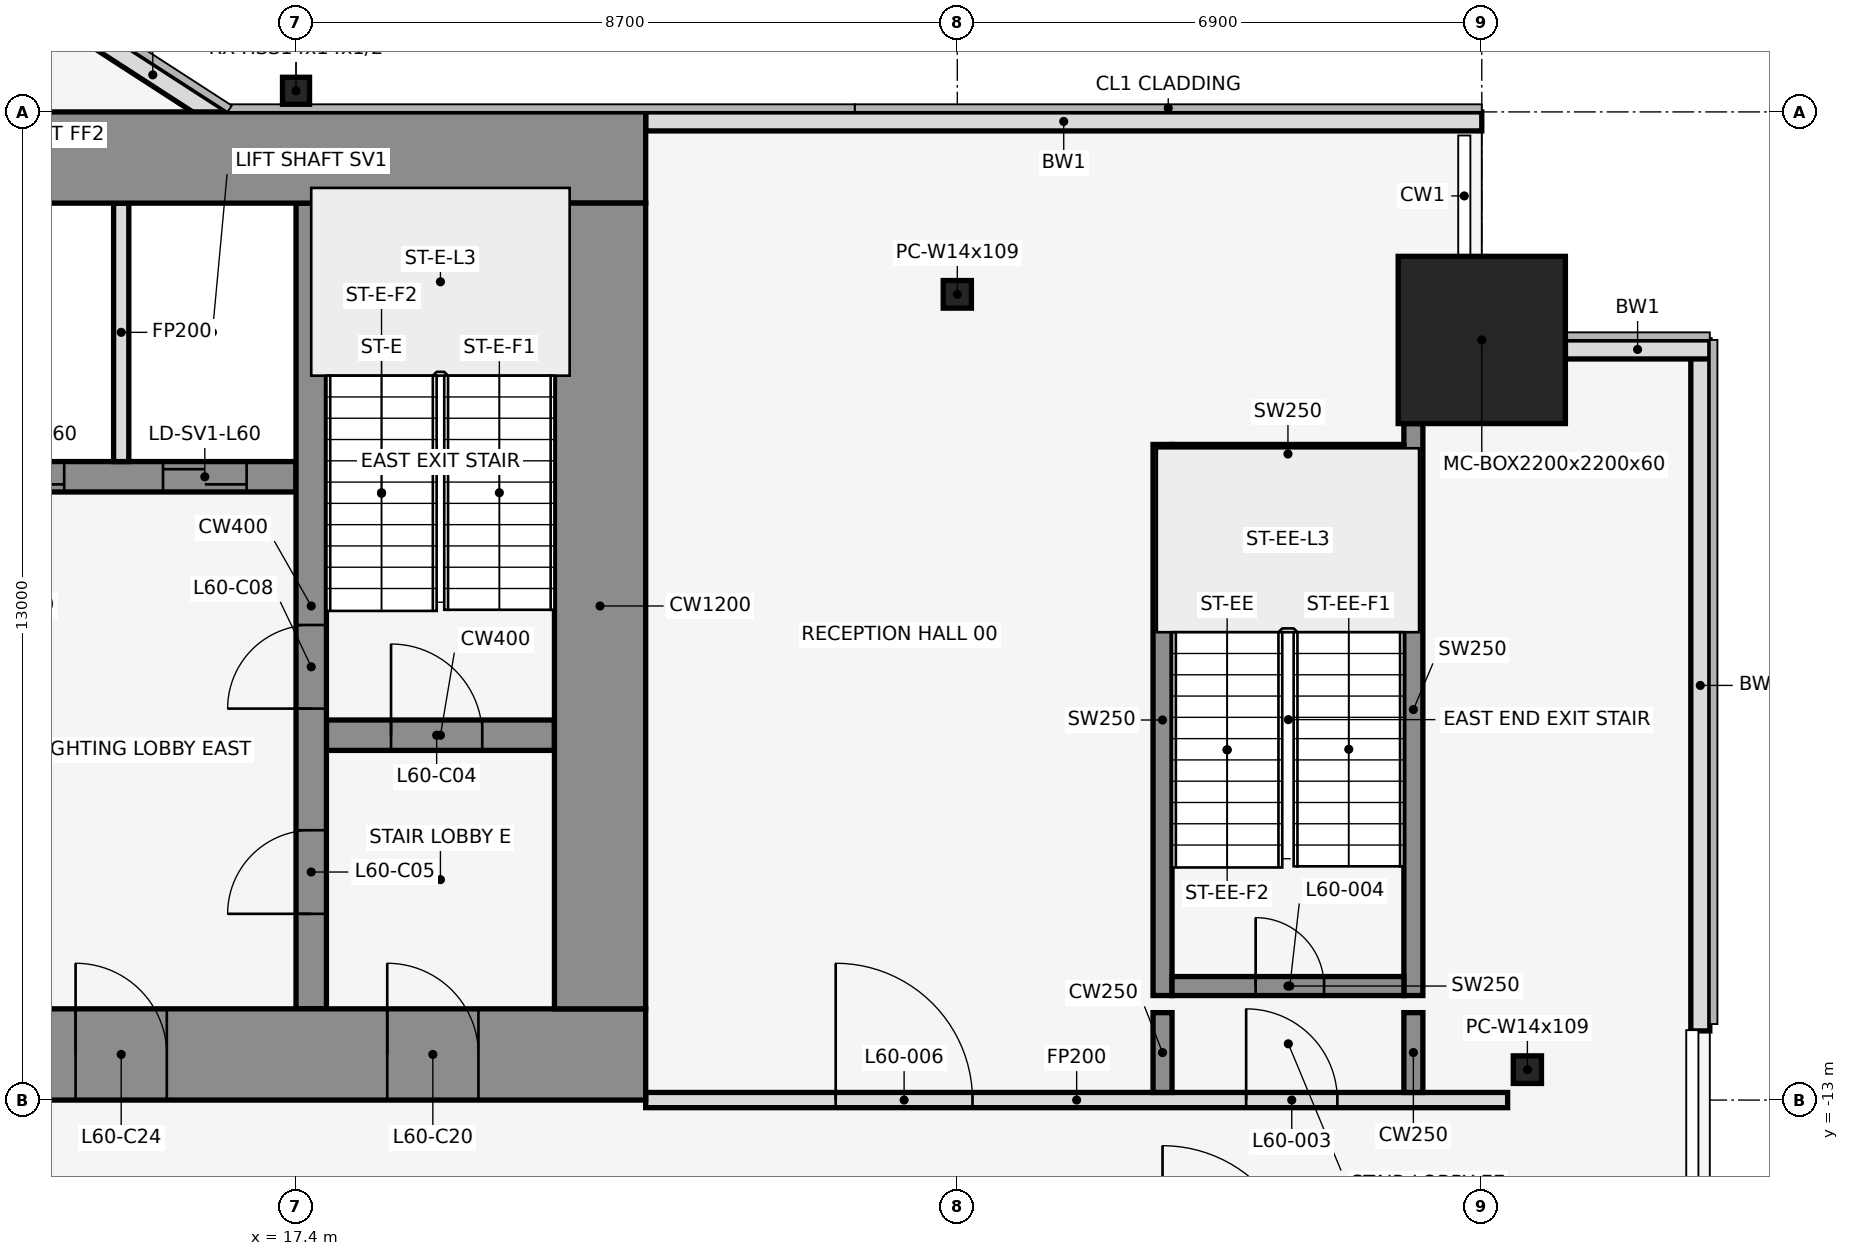
"""IFC4 building model, lengths in metres.
Left out: names, types, materials, properties, quantities, classifications, styles, units other than length and angle.
Written with IfcOpenShell. Run it as: python <this file> out.ifc"""

import sys

from ifc_helpers import new_model, si_unit, direction, frame, frame_2d, origin, origin_2d, place, context, subcontext, project, spatial, rectangle, hollow_rectangle, i_section, extrude, element, fill, save


model = new_model("IFC4")
c1 = context("Model", 3, precision=1e-05, world=origin(), true_north=direction((0.0, 1.0)))
c2 = subcontext(c1, "Body", "Model", "MODEL_VIEW")
j1 = project(units=[si_unit("LENGTHUNIT", "METRE"), si_unit("PLANEANGLEUNIT", "RADIAN")], contexts=[c1])
p1 = place(None, origin())
s1 = spatial("IfcSite", under=j1, at=p1, CompositionType="ELEMENT")
p2 = place(p1, origin())
s2 = spatial("IfcBuilding", under=s1, at=p2, CompositionType="ELEMENT")
p3 = place(p2, frame((0.0, 0.0, 266.6)))
s3 = spatial("IfcBuildingStorey", under=s2, at=p3, CompositionType="ELEMENT", Elevation=266.6)
p4 = place(p3, frame((26.1, -2.4, 0.0), z_axis=(0.0, 0.0, 1.0), x_axis=(1.0, 0.0, 0.0)))
e1 = element("IfcColumn", 1, at=p4, inside=s3, PredefinedType="COLUMN", context=c2, shape_type="SweptSolid", body=[
    extrude(i_section(OverallWidth=0.371, OverallDepth=0.363, WebThickness=0.013, FlangeThickness=0.022, at=origin_2d()), origin(), (0.0, 0.0, 1.0), 4.2),
])
p5 = place(p3, frame((33.0, -3.0, 0.0), z_axis=(0.0, 0.0, 1.0), x_axis=(1.0, 0.0, 0.0)))
e2 = element("IfcColumn", 2, at=p5, inside=s3, PredefinedType="COLUMN", context=c2, shape_type="SweptSolid", body=[
    extrude(hollow_rectangle(XDim=2.2, YDim=2.2, WallThickness=0.06, at=origin_2d()), origin(), (0.0, 0.0, 1.0), 4.2),
])
p6 = place(p3, frame((17.4, 0.278, 0.0), z_axis=(0.0, 0.0, 1.0), x_axis=(1.0, 0.0, 0.0)))
e3 = element("IfcColumn", 3, at=p6, inside=s3, PredefinedType="COLUMN", context=c2, shape_type="SweptSolid", body=[
    extrude(hollow_rectangle(XDim=0.356, YDim=0.356, WallThickness=0.012, at=origin_2d()), origin(), (0.0, 0.0, 1.0), 4.2),
])
p7 = place(p3, frame((33.6, -12.6, 0.0), z_axis=(0.0, 0.0, 1.0), x_axis=(1.0, 0.0, 0.0)))
e4 = element("IfcColumn", 4, at=p7, inside=s3, PredefinedType="COLUMN", context=c2, shape_type="SweptSolid", body=[
    extrude(i_section(OverallWidth=0.371, OverallDepth=0.363, WebThickness=0.013, FlangeThickness=0.022, at=origin_2d()), origin(), (0.0, 0.0, 1.0), 4.2),
])
p8 = place(p3, frame((33.0, -0.125, 0.0), z_axis=(0.0, 0.0, 1.0), x_axis=(-1.0, 0.0, 0.0)))
e5 = element("IfcWall", 5, at=p8, inside=s3, PredefinedType="STANDARD", context=c2, shape_type="SweptSolid", body=[
    extrude(rectangle(XDim=11.0, YDim=0.25, at=frame_2d((5.5, 0.0))), origin(), (0.0, 0.0, 1.0), 4.05),
])
p9 = place(p3, frame((16.432, -0.105, 0.0), z_axis=(0.0, 0.0, 1.0), x_axis=(-0.83981312244, 0.542875602121, 0.0)))
e6 = element("IfcWall", 6, at=p9, inside=s3, PredefinedType="STANDARD", context=c2, shape_type="SweptSolid", body=[
    extrude(rectangle(XDim=2.183, YDim=0.25, at=frame_2d((1.091, 0.0))), origin(), (0.0, 0.0, 1.0), 4.05),
])
p10 = place(p3, frame((35.875, -12.09, 0.0), z_axis=(0.0, 0.0, 1.0), x_axis=(0.0, 1.0, 0.0)))
e7 = element("IfcWall", 7, at=p10, inside=s3, PredefinedType="STANDARD", context=c2, shape_type="SweptSolid", body=[
    extrude(rectangle(XDim=9.09, YDim=0.25, at=frame_2d((4.545, 0.0))), origin(), (0.0, 0.0, 1.0), 4.05),
])
p11 = place(p3, frame((36.0, -3.125, 0.0), z_axis=(0.0, 0.0, 1.0), x_axis=(-1.0, 0.0, 0.0)))
e8 = element("IfcWall", 8, at=p11, inside=s3, PredefinedType="STANDARD", context=c2, shape_type="SweptSolid", body=[
    extrude(rectangle(XDim=1.9, YDim=0.25, at=frame_2d((0.95, 0.0))), origin(), (0.0, 0.0, 1.0), 4.05),
])
p12 = place(p3, frame((28.8, -11.625, 0.0), z_axis=(0.0, 0.0, 1.0), x_axis=(0.0, 1.0, 0.0)))
e9 = element("IfcWall", 9, at=p12, inside=s3, PredefinedType="SHEAR", context=c2, shape_type="SweptSolid", body=[
    extrude(rectangle(XDim=7.25, YDim=0.25, at=frame_2d((3.625, 0.0))), origin(), (0.0, 0.0, 1.0), 4.2),
])
p13 = place(p3, frame((32.1, -11.625, 0.0), z_axis=(0.0, 0.0, 1.0), x_axis=(0.0, 1.0, 0.0)))
e10 = element("IfcWall", 10, at=p13, inside=s3, PredefinedType="SHEAR", context=c2, shape_type="SweptSolid", body=[
    extrude(rectangle(XDim=7.525, YDim=0.25, at=frame_2d((3.762, 0.0))), origin(), (0.0, 0.0, 1.0), 4.2),
])
p14 = place(p3, frame((28.925, -11.5, 0.0), z_axis=(0.0, 0.0, 1.0), x_axis=(1.0, 0.0, 0.0)))
e11 = element("IfcWall", 11, at=p14, inside=s3, PredefinedType="SHEAR", context=c2, shape_type="SweptSolid", body=[
    extrude(rectangle(XDim=3.05, YDim=0.25, at=frame_2d((1.525, 0.0))), origin(), (0.0, 0.0, 1.0), 4.2),
])
p15 = place(p14, frame((1.1, 0.0, 0.0)))
e12 = element("IfcOpeningElement", 12, at=p15, cuts=e11, PredefinedType="OPENING", context=c2, shape_type="SweptSolid", body=[
    extrude(rectangle(XDim=0.9, YDim=2.1, at=frame_2d((0.45, 1.05))), frame((0.0, 0.137, 0.0), z_axis=(0.0, -1.0, 0.0), x_axis=(1.0, 0.0, 0.0)), (0.0, 0.0, 1.0), 0.274),
])
p16 = place(p3, frame((28.925, -4.5, 0.0), z_axis=(0.0, 0.0, 1.0), x_axis=(1.0, 0.0, 0.0)))
e13 = element("IfcWall", 13, at=p16, inside=s3, PredefinedType="SHEAR", context=c2, shape_type="SweptSolid", body=[
    extrude(rectangle(XDim=3.05, YDim=0.25, at=frame_2d((1.525, 0.0))), origin(), (0.0, 0.0, 1.0), 4.2),
])
p17 = place(p3, frame((22.0, -13.0, 0.0), z_axis=(0.0, 0.0, 1.0), x_axis=(1.0, 0.0, 0.0)))
e14 = element("IfcWall", 14, at=p17, inside=s3, PredefinedType="PARTITIONING", context=c2, shape_type="SweptSolid", body=[
    extrude(rectangle(XDim=11.34, YDim=0.2, at=frame_2d((5.67, 0.0))), origin(), (0.0, 0.0, 1.0), 3.118),
])
p18 = place(p17, frame((7.9, 0.0, 0.0)))
e15 = element("IfcOpeningElement", 15, at=p18, cuts=e14, PredefinedType="OPENING", context=c2, shape_type="SweptSolid", body=[
    extrude(rectangle(XDim=1.2, YDim=2.1, at=frame_2d((0.6, 1.05))), frame((0.0, 0.112, 0.0), z_axis=(0.0, -1.0, 0.0), x_axis=(1.0, 0.0, 0.0)), (0.0, 0.0, 1.0), 0.224),
])
p19 = place(p17, frame((2.5, 0.0, 0.0)))
e16 = element("IfcOpeningElement", 16, at=p19, cuts=e14, PredefinedType="OPENING", context=c2, shape_type="SweptSolid", body=[
    extrude(rectangle(XDim=1.8, YDim=2.1, at=frame_2d((0.9, 1.05))), frame((0.0, 0.112, 0.0), z_axis=(0.0, -1.0, 0.0), x_axis=(1.0, 0.0, 0.0)), (0.0, 0.0, 1.0), 0.224),
])
for number, where, z_axis, x_axis in (
    (17, (28.8, -12.9, 0.0), (0.0, 0.0, 1.0), (0.0, 1.0, 0.0)),
    (18, (32.1, -12.9, 0.0), (0.0, 0.0, 1.0), (0.0, 1.0, 0.0)),
):
    element("IfcWall", number, at=place(p3, frame(where, z_axis=z_axis, x_axis=x_axis)), inside=s3, PredefinedType="SHEAR", context=c2, shape_type="SweptSolid", body=[
        extrude(rectangle(XDim=1.05, YDim=0.25, at=frame_2d((0.525, 0.0))), origin(), (0.0, 0.0, 1.0), 4.2),
    ])
p20 = place(p3, frame((17.8, -8.2, 0.0), z_axis=(0.0, 0.0, 1.0), x_axis=(1.0, 0.0, 0.0)))
e19 = element("IfcWall", 19, at=p20, inside=s3, PredefinedType="SHEAR", context=c2, shape_type="SweptSolid", body=[
    extrude(rectangle(XDim=3.0, YDim=0.4, at=frame_2d((1.5, 0.0))), origin(), (0.0, 0.0, 1.0), 4.2),
])
p21 = place(p20, frame((0.85, 0.0, 0.0)))
e20 = element("IfcOpeningElement", 20, at=p21, cuts=e19, PredefinedType="OPENING", context=c2, shape_type="SweptSolid", body=[
    extrude(rectangle(XDim=1.2, YDim=2.1, at=frame_2d((0.6, 1.05))), frame((0.0, 0.212, 0.0), z_axis=(0.0, -1.0, 0.0), x_axis=(1.0, 0.0, 0.0)), (0.0, 0.0, 1.0), 0.424),
])
p22 = place(p3, frame((3.8, -4.8, 0.0), z_axis=(0.0, 0.0, 1.0), x_axis=(1.0, 0.0, 0.0)))
e21 = element("IfcWall", 21, at=p22, inside=s3, PredefinedType="SHEAR", context=c2, shape_type="SweptSolid", body=[
    extrude(rectangle(XDim=13.6, YDim=0.4, at=frame_2d((6.8, 0.0))), origin(), (0.0, 0.0, 1.0), 4.2),
])
p23 = place(p22, frame((0.75, 0.0, 0.0)))
e22 = element("IfcOpeningElement", 22, at=p23, cuts=e21, PredefinedType="OPENING", context=c2, shape_type="SweptSolid", body=[
    extrude(rectangle(XDim=1.2, YDim=2.1, at=frame_2d((0.6, 1.05))), frame((0.0, 0.212, 0.0), z_axis=(0.0, -1.0, 0.0), x_axis=(1.0, 0.0, 0.0)), (0.0, 0.0, 1.0), 0.424),
])
p24 = place(p22, frame((3.65, 0.0, 0.0)))
e23 = element("IfcOpeningElement", 23, at=p24, cuts=e21, PredefinedType="OPENING", context=c2, shape_type="SweptSolid", body=[
    extrude(rectangle(XDim=1.2, YDim=2.1, at=frame_2d((0.6, 1.05))), frame((0.0, 0.212, 0.0), z_axis=(0.0, -1.0, 0.0), x_axis=(1.0, 0.0, 0.0)), (0.0, 0.0, 1.0), 0.424),
])
p25 = place(p22, frame((6.65, 0.0, 0.0)))
e24 = element("IfcOpeningElement", 24, at=p25, cuts=e21, PredefinedType="OPENING", context=c2, shape_type="SweptSolid", body=[
    extrude(rectangle(XDim=1.2, YDim=2.1, at=frame_2d((0.6, 1.05))), frame((0.0, 0.212, 0.0), z_axis=(0.0, -1.0, 0.0), x_axis=(1.0, 0.0, 0.0)), (0.0, 0.0, 1.0), 0.424),
])
p26 = place(p22, frame((9.45, 0.0, 0.0)))
e25 = element("IfcOpeningElement", 25, at=p26, cuts=e21, PredefinedType="OPENING", context=c2, shape_type="SweptSolid", body=[
    extrude(rectangle(XDim=1.1, YDim=2.1, at=frame_2d((0.55, 1.05))), frame((0.0, 0.212, 0.0), z_axis=(0.0, -1.0, 0.0), x_axis=(1.0, 0.0, 0.0)), (0.0, 0.0, 1.0), 0.424),
])
p27 = place(p22, frame((11.85, 0.0, 0.0)))
e26 = element("IfcOpeningElement", 26, at=p27, cuts=e21, PredefinedType="OPENING", context=c2, shape_type="SweptSolid", body=[
    extrude(rectangle(XDim=1.1, YDim=2.1, at=frame_2d((0.55, 1.05))), frame((0.0, 0.212, 0.0), z_axis=(0.0, -1.0, 0.0), x_axis=(1.0, 0.0, 0.0)), (0.0, 0.0, 1.0), 0.424),
])
p28 = place(p3, frame((15.1, -4.6, 0.0), z_axis=(0.0, 0.0, 1.0), x_axis=(0.0, 1.0, 0.0)))
e27 = element("IfcWall", 27, at=p28, inside=s3, PredefinedType="PARTITIONING", context=c2, shape_type="SweptSolid", body=[
    extrude(rectangle(XDim=3.4, YDim=0.2, at=frame_2d((1.7, 0.0))), origin(), (0.0, 0.0, 1.0), 3.118),
])
p29 = place(p3, frame((17.6, -11.8, 0.0), z_axis=(0.0, 0.0, 1.0), x_axis=(0.0, 1.0, 0.0)))
e28 = element("IfcWall", 28, at=p29, inside=s3, PredefinedType="SHEAR", context=c2, shape_type="SweptSolid", body=[
    extrude(rectangle(XDim=10.6, YDim=0.4, at=frame_2d((5.3, 0.0))), origin(), (0.0, 0.0, 1.0), 4.2),
])
p30 = place(p29, frame((1.25, 0.0, 0.0)))
e29 = element("IfcOpeningElement", 29, at=p30, cuts=e28, PredefinedType="OPENING", context=c2, shape_type="SweptSolid", body=[
    extrude(rectangle(XDim=1.1, YDim=2.1, at=frame_2d((0.55, 1.05))), frame((0.0, 0.212, 0.0), z_axis=(0.0, -1.0, 0.0), x_axis=(1.0, 0.0, 0.0)), (0.0, 0.0, 1.0), 0.424),
])
p31 = place(p29, frame((3.95, 0.0, 0.0)))
e30 = element("IfcOpeningElement", 30, at=p31, cuts=e28, PredefinedType="OPENING", context=c2, shape_type="SweptSolid", body=[
    extrude(rectangle(XDim=1.1, YDim=2.1, at=frame_2d((0.55, 1.05))), frame((0.0, 0.212, 0.0), z_axis=(0.0, -1.0, 0.0), x_axis=(1.0, 0.0, 0.0)), (0.0, 0.0, 1.0), 0.424),
])
p32 = place(p3, frame((-22.0, -0.6, 0.0), z_axis=(0.0, 0.0, 1.0), x_axis=(1.0, 0.0, 0.0)))
e31 = element("IfcWall", 31, at=p32, inside=s3, PredefinedType="SHEAR", context=c2, shape_type="SweptSolid", body=[
    extrude(rectangle(XDim=44.0, YDim=1.2, at=frame_2d((22.0, 0.0))), origin(), (0.0, 0.0, 1.0), 4.2),
])
p33 = place(p32, frame((18.55, 0.0, 0.0)))
e32 = element("IfcOpeningElement", 32, at=p33, cuts=e31, PredefinedType="OPENING", context=c2, shape_type="SweptSolid", body=[
    extrude(rectangle(XDim=0.9, YDim=2.1, at=frame_2d((0.45, 1.05))), frame((0.0, 0.612, 0.0), z_axis=(0.0, -1.0, 0.0), x_axis=(1.0, 0.0, 0.0)), (0.0, 0.0, 1.0), 1.224),
])
p34 = place(p32, frame((24.55, 0.0, 0.0)))
e33 = element("IfcOpeningElement", 33, at=p34, cuts=e31, PredefinedType="OPENING", context=c2, shape_type="SweptSolid", body=[
    extrude(rectangle(XDim=0.9, YDim=2.1, at=frame_2d((0.45, 1.05))), frame((0.0, 0.612, 0.0), z_axis=(0.0, -1.0, 0.0), x_axis=(1.0, 0.0, 0.0)), (0.0, 0.0, 1.0), 1.224),
])
p35 = place(p3, frame((-22.0, -12.4, 0.0), z_axis=(0.0, 0.0, 1.0), x_axis=(1.0, 0.0, 0.0)))
e34 = element("IfcWall", 34, at=p35, inside=s3, PredefinedType="SHEAR", context=c2, shape_type="SweptSolid", body=[
    extrude(rectangle(XDim=44.0, YDim=1.2, at=frame_2d((22.0, 0.0))), origin(), (0.0, 0.0, 1.0), 4.2),
])
p36 = place(p35, frame((2.2, 0.0, 0.0)))
e35 = element("IfcOpeningElement", 35, at=p36, cuts=e34, PredefinedType="OPENING", context=c2, shape_type="SweptSolid", body=[
    extrude(rectangle(XDim=1.2, YDim=2.1, at=frame_2d((0.6, 1.05))), frame((0.0, 0.612, 0.0), z_axis=(0.0, -1.0, 0.0), x_axis=(1.0, 0.0, 0.0)), (0.0, 0.0, 1.0), 1.224),
])
p37 = place(p35, frame((21.4, 0.0, 0.0)))
e36 = element("IfcOpeningElement", 36, at=p37, cuts=e34, PredefinedType="OPENING", context=c2, shape_type="SweptSolid", body=[
    extrude(rectangle(XDim=1.2, YDim=2.1, at=frame_2d((0.6, 1.05))), frame((0.0, 0.612, 0.0), z_axis=(0.0, -1.0, 0.0), x_axis=(1.0, 0.0, 0.0)), (0.0, 0.0, 1.0), 1.224),
])
p38 = place(p35, frame((40.6, 0.0, 0.0)))
e37 = element("IfcOpeningElement", 37, at=p38, cuts=e34, PredefinedType="OPENING", context=c2, shape_type="SweptSolid", body=[
    extrude(rectangle(XDim=1.2, YDim=2.1, at=frame_2d((0.6, 1.05))), frame((0.0, 0.612, 0.0), z_axis=(0.0, -1.0, 0.0), x_axis=(1.0, 0.0, 0.0)), (0.0, 0.0, 1.0), 1.224),
])
p39 = place(p35, frame((16.0, 0.0, 0.0)))
e38 = element("IfcOpeningElement", 38, at=p39, cuts=e34, PredefinedType="OPENING", context=c2, shape_type="SweptSolid", body=[
    extrude(rectangle(XDim=1.8, YDim=2.1, at=frame_2d((0.9, 1.05))), frame((0.0, 0.612, 0.0), z_axis=(0.0, -1.0, 0.0), x_axis=(1.0, 0.0, 0.0)), (0.0, 0.0, 1.0), 1.224),
])
p40 = place(p35, frame((6.3, 0.0, 0.0)))
e39 = element("IfcOpeningElement", 39, at=p40, cuts=e34, PredefinedType="OPENING", context=c2, shape_type="SweptSolid", body=[
    extrude(rectangle(XDim=1.2, YDim=2.1, at=frame_2d((0.6, 1.05))), frame((0.0, 0.612, 0.0), z_axis=(0.0, -1.0, 0.0), x_axis=(1.0, 0.0, 0.0)), (0.0, 0.0, 1.0), 1.224),
])
p41 = place(p35, frame((26.2, 0.0, 0.0)))
e40 = element("IfcOpeningElement", 40, at=p41, cuts=e34, PredefinedType="OPENING", context=c2, shape_type="SweptSolid", body=[
    extrude(rectangle(XDim=1.8, YDim=2.1, at=frame_2d((0.9, 1.05))), frame((0.0, 0.612, 0.0), z_axis=(0.0, -1.0, 0.0), x_axis=(1.0, 0.0, 0.0)), (0.0, 0.0, 1.0), 1.224),
])
p42 = place(p35, frame((36.5, 0.0, 0.0)))
e41 = element("IfcOpeningElement", 41, at=p42, cuts=e34, PredefinedType="OPENING", context=c2, shape_type="SweptSolid", body=[
    extrude(rectangle(XDim=1.2, YDim=2.1, at=frame_2d((0.6, 1.05))), frame((0.0, 0.612, 0.0), z_axis=(0.0, -1.0, 0.0), x_axis=(1.0, 0.0, 0.0)), (0.0, 0.0, 1.0), 1.224),
])
p43 = place(p3, frame((21.4, -11.8, 0.0), z_axis=(0.0, 0.0, 1.0), x_axis=(0.0, 1.0, 0.0)))
e42 = element("IfcWall", 42, at=p43, inside=s3, PredefinedType="SHEAR", context=c2, shape_type="SweptSolid", body=[
    extrude(rectangle(XDim=10.6, YDim=1.2, at=frame_2d((5.3, 0.0))), origin(), (0.0, 0.0, 1.0), 4.2),
])
p44 = place(p18, origin())
e43 = element("IfcDoor", 43, at=p44, inside=s3, OperationType="SINGLE_SWING_RIGHT", PredefinedType="DOOR", context=c2, shape_type="SweptSolid", body=[
    extrude(rectangle(XDim=1.2, YDim=2.1, at=frame_2d((0.6, 1.05))), frame((0.0, 0.025, 0.0), z_axis=(0.0, -1.0, 0.0), x_axis=(1.0, 0.0, 0.0)), (0.0, 0.0, 1.0), 0.05),
])
fill(e15, e43)
p45 = place(p15, origin())
e44 = element("IfcDoor", 44, at=p45, inside=s3, OperationType="SINGLE_SWING_LEFT", PredefinedType="DOOR", context=c2, shape_type="SweptSolid", body=[
    extrude(rectangle(XDim=0.9, YDim=2.1, at=frame_2d((0.45, 1.05))), frame((0.0, 0.025, 0.0), z_axis=(0.0, -1.0, 0.0), x_axis=(1.0, 0.0, 0.0)), (0.0, 0.0, 1.0), 0.05),
])
fill(e12, e44)
p46 = place(p19, origin())
e45 = element("IfcDoor", 45, at=p46, inside=s3, OperationType="SINGLE_SWING_LEFT", PredefinedType="DOOR", context=c2, shape_type="SweptSolid", body=[
    extrude(rectangle(XDim=1.8, YDim=2.1, at=frame_2d((0.9, 1.05))), frame((0.0, 0.025, 0.0), z_axis=(0.0, -1.0, 0.0), x_axis=(1.0, 0.0, 0.0)), (0.0, 0.0, 1.0), 0.05),
])
fill(e16, e45)
p47 = place(p21, origin())
e46 = element("IfcDoor", 46, at=p47, inside=s3, OperationType="SINGLE_SWING_RIGHT", PredefinedType="DOOR", context=c2, shape_type="SweptSolid", body=[
    extrude(rectangle(XDim=1.2, YDim=2.1, at=frame_2d((0.6, 1.05))), frame((0.0, 0.025, 0.0), z_axis=(0.0, -1.0, 0.0), x_axis=(1.0, 0.0, 0.0)), (0.0, 0.0, 1.0), 0.05),
])
fill(e20, e46)
p48 = place(p30, origin())
e47 = element("IfcDoor", 47, at=p48, inside=s3, OperationType="SINGLE_SWING_LEFT", PredefinedType="DOOR", context=c2, shape_type="SweptSolid", body=[
    extrude(rectangle(XDim=1.1, YDim=2.1, at=frame_2d((0.55, 1.05))), frame((0.0, 0.025, 0.0), z_axis=(0.0, -1.0, 0.0), x_axis=(1.0, 0.0, 0.0)), (0.0, 0.0, 1.0), 0.05),
])
fill(e29, e47)
p49 = place(p26, origin())
e48 = element("IfcDoor", 48, at=p49, inside=s3, OperationType="DOUBLE_DOOR_SLIDING", PredefinedType="DOOR", context=c2, shape_type="SweptSolid", body=[
    extrude(rectangle(XDim=1.1, YDim=2.1, at=frame_2d((0.55, 1.05))), frame((0.0, 0.025, 0.0), z_axis=(0.0, -1.0, 0.0), x_axis=(1.0, 0.0, 0.0)), (0.0, 0.0, 1.0), 0.05),
])
fill(e25, e48)
p50 = place(p27, origin())
e49 = element("IfcDoor", 49, at=p50, inside=s3, OperationType="DOUBLE_DOOR_SLIDING", PredefinedType="DOOR", context=c2, shape_type="SweptSolid", body=[
    extrude(rectangle(XDim=1.1, YDim=2.1, at=frame_2d((0.55, 1.05))), frame((0.0, 0.025, 0.0), z_axis=(0.0, -1.0, 0.0), x_axis=(1.0, 0.0, 0.0)), (0.0, 0.0, 1.0), 0.05),
])
fill(e26, e49)
p51 = place(p31, origin())
e50 = element("IfcDoor", 50, at=p51, inside=s3, OperationType="SINGLE_SWING_RIGHT", PredefinedType="DOOR", context=c2, shape_type="SweptSolid", body=[
    extrude(rectangle(XDim=1.1, YDim=2.1, at=frame_2d((0.55, 1.05))), frame((0.0, 0.025, 0.0), z_axis=(0.0, -1.0, 0.0), x_axis=(1.0, 0.0, 0.0)), (0.0, 0.0, 1.0), 0.05),
])
fill(e30, e50)
p52 = place(p38, frame((1.2, 0.0, 0.0), z_axis=(0.0, 0.0, 1.0), x_axis=(-1.0, 0.0, 0.0)))
e51 = element("IfcDoor", 51, at=p52, inside=s3, OperationType="SINGLE_SWING_RIGHT", PredefinedType="DOOR", context=c2, shape_type="SweptSolid", body=[
    extrude(rectangle(XDim=1.2, YDim=2.1, at=frame_2d((0.6, 1.05))), frame((0.0, 0.025, 0.0), z_axis=(0.0, -1.0, 0.0), x_axis=(1.0, 0.0, 0.0)), (0.0, 0.0, 1.0), 0.05),
])
fill(e37, e51)
p53 = place(p42, frame((1.2, 0.0, 0.0), z_axis=(0.0, 0.0, 1.0), x_axis=(-1.0, 0.0, 0.0)))
e52 = element("IfcDoor", 52, at=p53, inside=s3, OperationType="SINGLE_SWING_RIGHT", PredefinedType="DOOR", context=c2, shape_type="SweptSolid", body=[
    extrude(rectangle(XDim=1.2, YDim=2.1, at=frame_2d((0.6, 1.05))), frame((0.0, 0.025, 0.0), z_axis=(0.0, -1.0, 0.0), x_axis=(1.0, 0.0, 0.0)), (0.0, 0.0, 1.0), 0.05),
])
fill(e41, e52)
save(model, sys.argv[1])
